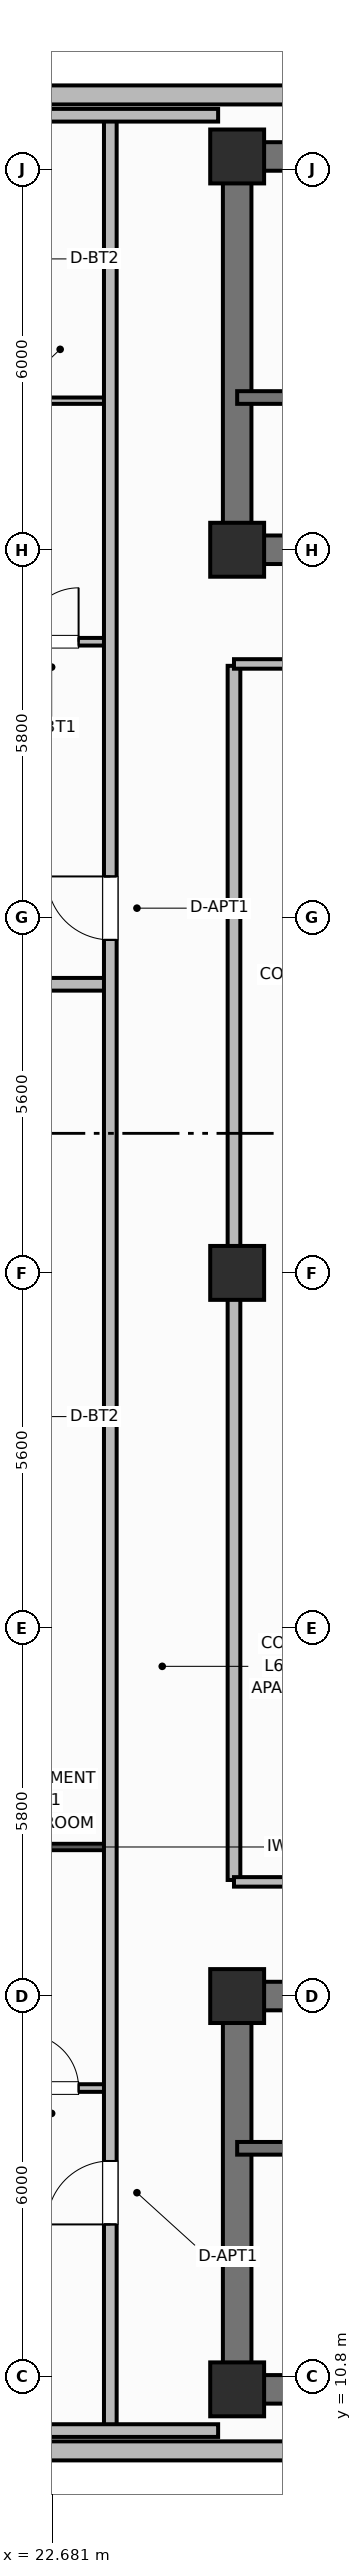
"""IFC4 building model, lengths in metres.
Left out: names, types, materials, properties, quantities, classifications, styles, units other than length and angle.
Written with IfcOpenShell. Run it as: python <this file> out.ifc"""

import sys

from ifc_helpers import new_model, si_unit, direction, frame, frame_2d, origin, origin_2d, place, context, subcontext, project, spatial, rectangle, extrude, element, fill, save


model = new_model("IFC4")
c1 = context("Model", 3, precision=1e-05, world=origin(), true_north=direction((0.0, 1.0)))
c2 = subcontext(c1, "Body", "Model", "MODEL_VIEW")
j1 = project(units=[si_unit("LENGTHUNIT", "METRE"), si_unit("PLANEANGLEUNIT", "RADIAN")], contexts=[c1])
p1 = place(None, origin())
s1 = spatial("IfcSite", under=j1, at=p1, CompositionType="ELEMENT")
p2 = place(p1, origin())
s2 = spatial("IfcBuilding", under=s1, at=p2, CompositionType="ELEMENT")
p3 = place(p2, frame((0.0, 0.0, 251.7)))
s3 = spatial("IfcBuildingStorey", under=s2, at=p3, CompositionType="ELEMENT", Elevation=251.7)
p4 = place(p3, frame((52.8, 10.6, 0.0), z_axis=(0.0, 0.0, 1.0), x_axis=(-1.0, 0.0, 0.0)))
e1 = element("IfcWall", 1, at=p4, inside=s3, PredefinedType="SHEAR", context=c2, shape_type="SweptSolid", body=[
    extrude(rectangle(XDim=27.2, YDim=0.45, at=frame_2d((13.6, 0.0))), origin(), (0.0, 0.0, 1.0), 3.7),
])
p5 = place(p3, frame((25.6, 10.825, 0.0), z_axis=(0.0, 0.0, 1.0), x_axis=(0.0, 1.0, 0.0)))
e2 = element("IfcWall", 2, at=p5, inside=s3, PredefinedType="SHEAR", context=c2, shape_type="SweptSolid", body=[
    extrude(rectangle(XDim=5.75, YDim=0.45, at=frame_2d((2.875, 0.0))), origin(), (0.0, 0.0, 1.0), 3.7),
])
p6 = place(p3, frame((25.6, 16.8, 0.0), z_axis=(0.0, 0.0, 1.0), x_axis=(1.0, 0.0, 0.0)))
e3 = element("IfcWall", 3, at=p6, inside=s3, PredefinedType="SHEAR", context=c2, shape_type="SweptSolid", body=[
    extrude(rectangle(XDim=27.2, YDim=0.45, at=frame_2d((13.6, 0.0))), origin(), (0.0, 0.0, 1.0), 3.7),
])
p7 = place(p6, frame((1.8, 0.0, 0.0)))
e4 = element("IfcOpeningElement", 4, at=p7, cuts=e3, PredefinedType="OPENING", context=c2, shape_type="SweptSolid", body=[
    extrude(rectangle(XDim=1.1, YDim=2.15, at=frame_2d((0.55, 1.075))), frame((0.0, 0.235, 0.0), z_axis=(0.0, -1.0, 0.0), x_axis=(1.0, 0.0, 0.0)), (0.0, 0.0, 1.0), 0.47),
])
p8 = place(p6, frame((5.6, 0.0, 0.0)))
e5 = element("IfcOpeningElement", 5, at=p8, cuts=e3, PredefinedType="OPENING", context=c2, shape_type="SweptSolid", body=[
    extrude(rectangle(XDim=0.85, YDim=2.1, at=frame_2d((0.425, 1.05))), frame((0.0, 0.235, 0.0), z_axis=(0.0, -1.0, 0.0), x_axis=(1.0, 0.0, 0.0)), (0.0, 0.0, 1.0), 0.47),
])
p9 = place(p6, frame((13.0, 0.0, 0.0)))
e6 = element("IfcOpeningElement", 6, at=p9, cuts=e3, PredefinedType="OPENING", context=c2, shape_type="SweptSolid", body=[
    extrude(rectangle(XDim=1.2, YDim=2.15, at=frame_2d((0.6, 1.075))), frame((0.0, 0.235, 0.0), z_axis=(0.0, -1.0, 0.0), x_axis=(1.0, 0.0, 0.0)), (0.0, 0.0, 1.0), 0.47),
])
p10 = place(p6, frame((19.2, 0.0, 0.0)))
e7 = element("IfcOpeningElement", 7, at=p10, cuts=e3, PredefinedType="OPENING", context=c2, shape_type="SweptSolid", body=[
    extrude(rectangle(XDim=0.85, YDim=2.1, at=frame_2d((0.425, 1.05))), frame((0.0, 0.235, 0.0), z_axis=(0.0, -1.0, 0.0), x_axis=(1.0, 0.0, 0.0)), (0.0, 0.0, 1.0), 0.47),
])
p11 = place(p6, frame((23.8, 0.0, 0.0)))
e8 = element("IfcOpeningElement", 8, at=p11, cuts=e3, PredefinedType="OPENING", context=c2, shape_type="SweptSolid", body=[
    extrude(rectangle(XDim=0.9, YDim=2.1, at=frame_2d((0.45, 1.05))), frame((0.0, 0.235, 0.0), z_axis=(0.0, -1.0, 0.0), x_axis=(1.0, 0.0, 0.0)), (0.0, 0.0, 1.0), 0.47),
])
p12 = place(p3, frame((25.6, 45.8, 0.0), z_axis=(0.0, 0.0, 1.0), x_axis=(1.0, 0.0, 0.0)))
e9 = element("IfcWall", 9, at=p12, inside=s3, PredefinedType="SHEAR", context=c2, shape_type="SweptSolid", body=[
    extrude(rectangle(XDim=27.2, YDim=0.45, at=frame_2d((13.6, 0.0))), origin(), (0.0, 0.0, 1.0), 3.7),
])
p13 = place(p3, frame((25.6, 39.825, 0.0), z_axis=(0.0, 0.0, 1.0), x_axis=(0.0, 1.0, 0.0)))
e10 = element("IfcWall", 10, at=p13, inside=s3, PredefinedType="SHEAR", context=c2, shape_type="SweptSolid", body=[
    extrude(rectangle(XDim=5.75, YDim=0.45, at=frame_2d((2.875, 0.0))), origin(), (0.0, 0.0, 1.0), 3.7),
])
p14 = place(p3, frame((52.8, 39.6, 0.0), z_axis=(0.0, 0.0, 1.0), x_axis=(-1.0, 0.0, 0.0)))
e11 = element("IfcWall", 11, at=p14, inside=s3, PredefinedType="SHEAR", context=c2, shape_type="SweptSolid", body=[
    extrude(rectangle(XDim=27.2, YDim=0.45, at=frame_2d((13.6, 0.0))), origin(), (0.0, 0.0, 1.0), 3.7),
])
p15 = place(p14, frame((24.2, 0.0, 0.0)))
e12 = element("IfcOpeningElement", 12, at=p15, cuts=e11, PredefinedType="OPENING", context=c2, shape_type="SweptSolid", body=[
    extrude(rectangle(XDim=1.1, YDim=2.15, at=frame_2d((0.55, 1.075))), frame((0.0, 0.235, 0.0), z_axis=(0.0, -1.0, 0.0), x_axis=(1.0, 0.0, 0.0)), (0.0, 0.0, 1.0), 0.47),
])
p16 = place(p14, frame((20.55, 0.0, 0.0)))
e13 = element("IfcOpeningElement", 13, at=p16, cuts=e11, PredefinedType="OPENING", context=c2, shape_type="SweptSolid", body=[
    extrude(rectangle(XDim=0.95, YDim=2.1, at=frame_2d((0.475, 1.05))), frame((0.0, 0.235, 0.0), z_axis=(0.0, -1.0, 0.0), x_axis=(1.0, 0.0, 0.0)), (0.0, 0.0, 1.0), 0.47),
])
p17 = place(p14, frame((15.1, 0.0, 0.0)))
e14 = element("IfcOpeningElement", 14, at=p17, cuts=e11, PredefinedType="OPENING", context=c2, shape_type="SweptSolid", body=[
    extrude(rectangle(XDim=1.2, YDim=2.15, at=frame_2d((0.6, 1.075))), frame((0.0, 0.235, 0.0), z_axis=(0.0, -1.0, 0.0), x_axis=(1.0, 0.0, 0.0)), (0.0, 0.0, 1.0), 0.47),
])
p18 = place(p14, frame((13.05, 0.0, 0.0)))
e15 = element("IfcOpeningElement", 15, at=p18, cuts=e11, PredefinedType="OPENING", context=c2, shape_type="SweptSolid", body=[
    extrude(rectangle(XDim=0.85, YDim=2.1, at=frame_2d((0.425, 1.05))), frame((0.0, 0.235, 0.0), z_axis=(0.0, -1.0, 0.0), x_axis=(1.0, 0.0, 0.0)), (0.0, 0.0, 1.0), 0.47),
])
p19 = place(p14, frame((11.0, 0.0, 0.0)))
e16 = element("IfcOpeningElement", 16, at=p19, cuts=e11, PredefinedType="OPENING", context=c2, shape_type="SweptSolid", body=[
    extrude(rectangle(XDim=0.85, YDim=2.1, at=frame_2d((0.425, 1.05))), frame((0.0, 0.235, 0.0), z_axis=(0.0, -1.0, 0.0), x_axis=(1.0, 0.0, 0.0)), (0.0, 0.0, 1.0), 0.47),
])
p20 = place(p14, frame((7.35, 0.0, 0.0)))
e17 = element("IfcOpeningElement", 17, at=p20, cuts=e11, PredefinedType="OPENING", context=c2, shape_type="SweptSolid", body=[
    extrude(rectangle(XDim=0.85, YDim=2.1, at=frame_2d((0.425, 1.05))), frame((0.0, 0.235, 0.0), z_axis=(0.0, -1.0, 0.0), x_axis=(1.0, 0.0, 0.0)), (0.0, 0.0, 1.0), 0.47),
])
p21 = place(p14, frame((4.2, 0.0, 0.0)))
e18 = element("IfcOpeningElement", 18, at=p21, cuts=e11, PredefinedType="OPENING", context=c2, shape_type="SweptSolid", body=[
    extrude(rectangle(XDim=1.3, YDim=2.2, at=frame_2d((0.65, 1.1))), frame((0.0, 0.235, 0.0), z_axis=(0.0, -1.0, 0.0), x_axis=(1.0, 0.0, 0.0)), (0.0, 0.0, 1.0), 0.47),
])
for number, where, z_axis, x_axis in (
    (19, (25.6, 10.6, 0.0), (0.0, 0.0, 1.0), (1.0, 0.0, 0.0)),
    (20, (25.6, 16.8, 0.0), (0.0, 0.0, 1.0), (1.0, 0.0, 0.0)),
    (21, (25.6, 39.6, 0.0), (0.0, 0.0, 1.0), (1.0, 0.0, 0.0)),
    (22, (25.6, 45.8, 0.0), (0.0, 0.0, 1.0), (1.0, 0.0, 0.0)),
    (23, (25.6, 28.2, 0.0), (0.0, 0.0, 1.0), (1.0, 0.0, 0.0)),
):
    element("IfcColumn", number, at=place(p3, frame(where, z_axis=z_axis, x_axis=x_axis)), inside=s3, PredefinedType="COLUMN", context=c2, shape_type="SweptSolid", body=[
        extrude(rectangle(XDim=0.85, YDim=0.85, at=origin_2d()), origin(), (0.0, 0.0, 1.0), 3.7),
    ])
p22 = place(p3, frame((22.56, 9.63, 0.0), z_axis=(0.0, 0.0, 1.0), x_axis=(1.0, 0.0, 0.0)))
e24 = element("IfcWall", 24, at=p22, inside=s3, PredefinedType="SOLIDWALL", context=c2, shape_type="SweptSolid", body=[
    extrude(rectangle(XDim=33.28, YDim=0.3, at=frame_2d((16.64, 0.0))), origin(), (0.0, 0.0, 1.0), 2.73),
])
p23 = place(p22, frame((4.461, 0.0, 0.95)))
e25 = element("IfcOpeningElement", 25, at=p23, cuts=e24, PredefinedType="OPENING", context=c2, shape_type="SweptSolid", body=[
    extrude(rectangle(XDim=1.1, YDim=1.65, at=frame_2d((0.55, 0.825))), frame((0.0, 0.16, 0.0), z_axis=(0.0, -1.0, 0.0), x_axis=(1.0, 0.0, 0.0)), (0.0, 0.0, 1.0), 0.32),
])
p24 = place(p22, frame((7.368, 0.0, 0.95)))
e26 = element("IfcOpeningElement", 26, at=p24, cuts=e24, PredefinedType="OPENING", context=c2, shape_type="SweptSolid", body=[
    extrude(rectangle(XDim=1.1, YDim=1.65, at=frame_2d((0.55, 0.825))), frame((0.0, 0.16, 0.0), z_axis=(0.0, -1.0, 0.0), x_axis=(1.0, 0.0, 0.0)), (0.0, 0.0, 1.0), 0.32),
])
p25 = place(p22, frame((10.275, 0.0, 0.95)))
e27 = element("IfcOpeningElement", 27, at=p25, cuts=e24, PredefinedType="OPENING", context=c2, shape_type="SweptSolid", body=[
    extrude(rectangle(XDim=1.1, YDim=1.65, at=frame_2d((0.55, 0.825))), frame((0.0, 0.16, 0.0), z_axis=(0.0, -1.0, 0.0), x_axis=(1.0, 0.0, 0.0)), (0.0, 0.0, 1.0), 0.32),
])
p26 = place(p22, frame((13.883, 0.0, 0.95)))
e28 = element("IfcOpeningElement", 28, at=p26, cuts=e24, PredefinedType="OPENING", context=c2, shape_type="SweptSolid", body=[
    extrude(rectangle(XDim=1.1, YDim=1.65, at=frame_2d((0.55, 0.825))), frame((0.0, 0.16, 0.0), z_axis=(0.0, -1.0, 0.0), x_axis=(1.0, 0.0, 0.0)), (0.0, 0.0, 1.0), 0.32),
])
p27 = place(p22, frame((16.09, 0.0, 0.95)))
e29 = element("IfcOpeningElement", 29, at=p27, cuts=e24, PredefinedType="OPENING", context=c2, shape_type="SweptSolid", body=[
    extrude(rectangle(XDim=1.1, YDim=1.65, at=frame_2d((0.55, 0.825))), frame((0.0, 0.16, 0.0), z_axis=(0.0, -1.0, 0.0), x_axis=(1.0, 0.0, 0.0)), (0.0, 0.0, 1.0), 0.32),
])
p28 = place(p22, frame((18.297, 0.0, 0.95)))
e30 = element("IfcOpeningElement", 30, at=p28, cuts=e24, PredefinedType="OPENING", context=c2, shape_type="SweptSolid", body=[
    extrude(rectangle(XDim=1.1, YDim=1.65, at=frame_2d((0.55, 0.825))), frame((0.0, 0.16, 0.0), z_axis=(0.0, -1.0, 0.0), x_axis=(1.0, 0.0, 0.0)), (0.0, 0.0, 1.0), 0.32),
])
p29 = place(p22, frame((21.905, 0.0, 0.95)))
e31 = element("IfcOpeningElement", 31, at=p29, cuts=e24, PredefinedType="OPENING", context=c2, shape_type="SweptSolid", body=[
    extrude(rectangle(XDim=1.1, YDim=1.65, at=frame_2d((0.55, 0.825))), frame((0.0, 0.16, 0.0), z_axis=(0.0, -1.0, 0.0), x_axis=(1.0, 0.0, 0.0)), (0.0, 0.0, 1.0), 0.32),
])
p30 = place(p22, frame((24.812, 0.0, 0.95)))
e32 = element("IfcOpeningElement", 32, at=p30, cuts=e24, PredefinedType="OPENING", context=c2, shape_type="SweptSolid", body=[
    extrude(rectangle(XDim=1.1, YDim=1.65, at=frame_2d((0.55, 0.825))), frame((0.0, 0.16, 0.0), z_axis=(0.0, -1.0, 0.0), x_axis=(1.0, 0.0, 0.0)), (0.0, 0.0, 1.0), 0.32),
])
p31 = place(p22, frame((27.719, 0.0, 0.95)))
e33 = element("IfcOpeningElement", 33, at=p31, cuts=e24, PredefinedType="OPENING", context=c2, shape_type="SweptSolid", body=[
    extrude(rectangle(XDim=1.1, YDim=1.65, at=frame_2d((0.55, 0.825))), frame((0.0, 0.16, 0.0), z_axis=(0.0, -1.0, 0.0), x_axis=(1.0, 0.0, 0.0)), (0.0, 0.0, 1.0), 0.32),
])
p32 = place(p3, frame((55.84, 46.77, 0.0), z_axis=(0.0, 0.0, 1.0), x_axis=(-1.0, 0.0, 0.0)))
e34 = element("IfcWall", 34, at=p32, inside=s3, PredefinedType="SOLIDWALL", context=c2, shape_type="SweptSolid", body=[
    extrude(rectangle(XDim=33.28, YDim=0.3, at=frame_2d((16.64, 0.0))), origin(), (0.0, 0.0, 1.0), 2.73),
])
p33 = place(p32, frame((4.647, 0.0, 0.71)))
e35 = element("IfcOpeningElement", 35, at=p33, cuts=e34, PredefinedType="OPENING", context=c2, shape_type="SweptSolid", body=[
    extrude(rectangle(XDim=1.6, YDim=1.9, at=frame_2d((0.8, 0.95))), frame((0.0, 0.16, 0.0), z_axis=(0.0, -1.0, 0.0), x_axis=(1.0, 0.0, 0.0)), (0.0, 0.0, 1.0), 0.32),
])
p34 = place(p32, frame((7.845, 0.0, 0.71)))
e36 = element("IfcOpeningElement", 36, at=p34, cuts=e34, PredefinedType="OPENING", context=c2, shape_type="SweptSolid", body=[
    extrude(rectangle(XDim=1.6, YDim=1.9, at=frame_2d((0.8, 0.95))), frame((0.0, 0.16, 0.0), z_axis=(0.0, -1.0, 0.0), x_axis=(1.0, 0.0, 0.0)), (0.0, 0.0, 1.0), 0.32),
])
p35 = place(p32, frame((14.241, 0.0, 0.71)))
e37 = element("IfcOpeningElement", 37, at=p35, cuts=e34, PredefinedType="OPENING", context=c2, shape_type="SweptSolid", body=[
    extrude(rectangle(XDim=1.6, YDim=1.9, at=frame_2d((0.8, 0.95))), frame((0.0, 0.16, 0.0), z_axis=(0.0, -1.0, 0.0), x_axis=(1.0, 0.0, 0.0)), (0.0, 0.0, 1.0), 0.32),
])
p36 = place(p32, frame((17.439, 0.0, 0.71)))
e38 = element("IfcOpeningElement", 38, at=p36, cuts=e34, PredefinedType="OPENING", context=c2, shape_type="SweptSolid", body=[
    extrude(rectangle(XDim=1.6, YDim=1.9, at=frame_2d((0.8, 0.95))), frame((0.0, 0.16, 0.0), z_axis=(0.0, -1.0, 0.0), x_axis=(1.0, 0.0, 0.0)), (0.0, 0.0, 1.0), 0.32),
])
p37 = place(p32, frame((23.835, 0.0, 0.71)))
e39 = element("IfcOpeningElement", 39, at=p37, cuts=e34, PredefinedType="OPENING", context=c2, shape_type="SweptSolid", body=[
    extrude(rectangle(XDim=1.6, YDim=1.9, at=frame_2d((0.8, 0.95))), frame((0.0, 0.16, 0.0), z_axis=(0.0, -1.0, 0.0), x_axis=(1.0, 0.0, 0.0)), (0.0, 0.0, 1.0), 0.32),
])
p38 = place(p32, frame((27.033, 0.0, 0.71)))
e40 = element("IfcOpeningElement", 40, at=p38, cuts=e34, PredefinedType="OPENING", context=c2, shape_type="SweptSolid", body=[
    extrude(rectangle(XDim=1.6, YDim=1.9, at=frame_2d((0.8, 0.95))), frame((0.0, 0.16, 0.0), z_axis=(0.0, -1.0, 0.0), x_axis=(1.0, 0.0, 0.0)), (0.0, 0.0, 1.0), 0.32),
])
p39 = place(p3, frame((25.6, 14.4, 0.0), z_axis=(0.0, 0.0, 1.0), x_axis=(1.0, 0.0, 0.0)))
e41 = element("IfcWall", 41, at=p39, inside=s3, PredefinedType="SHEAR", context=c2, shape_type="SweptSolid", body=[
    extrude(rectangle(XDim=9.55, YDim=0.2, at=frame_2d((4.775, 0.0))), origin(), (0.0, 0.0, 1.0), 3.7),
])
p40 = place(p39, frame((1.05, 0.0, 0.0)))
e42 = element("IfcOpeningElement", 42, at=p40, cuts=e41, PredefinedType="OPENING", context=c2, shape_type="SweptSolid", body=[
    extrude(rectangle(XDim=1.1, YDim=2.15, at=frame_2d((0.55, 1.075))), frame((0.0, 0.11, 0.0), z_axis=(0.0, -1.0, 0.0), x_axis=(1.0, 0.0, 0.0)), (0.0, 0.0, 1.0), 0.22),
])
p41 = place(p3, frame((35.15, 42.0, 0.0), z_axis=(0.0, 0.0, 1.0), x_axis=(-1.0, 0.0, 0.0)))
e43 = element("IfcWall", 43, at=p41, inside=s3, PredefinedType="SHEAR", context=c2, shape_type="SweptSolid", body=[
    extrude(rectangle(XDim=9.55, YDim=0.2, at=frame_2d((4.775, 0.0))), origin(), (0.0, 0.0, 1.0), 3.7),
])
p42 = place(p41, frame((7.25, 0.0, 0.0)))
e44 = element("IfcOpeningElement", 44, at=p42, cuts=e43, PredefinedType="OPENING", context=c2, shape_type="SweptSolid", body=[
    extrude(rectangle(XDim=1.1, YDim=2.15, at=frame_2d((0.55, 1.075))), frame((0.0, 0.11, 0.0), z_axis=(0.0, -1.0, 0.0), x_axis=(1.0, 0.0, 0.0)), (0.0, 0.0, 1.0), 0.22),
])
p43 = place(p3, frame((25.55, 18.63, 0.0), z_axis=(0.0, 0.0, 1.0), x_axis=(0.0, 1.0, 0.0)))
e45 = element("IfcWall", 45, at=p43, inside=s3, PredefinedType="PARTITIONING", context=c2, shape_type="SweptSolid", body=[
    extrude(rectangle(XDim=19.14, YDim=0.2, at=frame_2d((9.57, 0.0))), origin(), (0.0, 0.0, 1.0), 2.56),
])
for number, where, z_axis, x_axis in (
    (46, (25.55, 18.6, 0.0), (0.0, 0.0, 1.0), (1.0, 0.0, 0.0)),
    (47, (25.55, 37.8, 0.0), (0.0, 0.0, 1.0), (1.0, 0.0, 0.0)),
):
    element("IfcWall", number, at=place(p3, frame(where, z_axis=z_axis, x_axis=x_axis)), inside=s3, PredefinedType="PARTITIONING", context=c2, shape_type="SweptSolid", body=[
        extrude(rectangle(XDim=3.5, YDim=0.15, at=frame_2d((1.75, 0.0))), origin(), (0.0, 0.0, 1.0), 2.56),
    ])
p44 = place(p3, frame((21.65, 15.35, 0.0), z_axis=(0.0, 0.0, 1.0), x_axis=(1.0, 0.0, 0.0)))
e48 = element("IfcWall", 48, at=p44, inside=s3, PredefinedType="PARTITIONING", context=c2, shape_type="SweptSolid", body=[
    extrude(rectangle(XDim=1.95, YDim=0.12, at=frame_2d((0.975, 0.0))), origin(), (0.0, 0.0, 1.0), 2.56),
])
p45 = place(p44, frame((0.6, 0.0, 0.0)))
e49 = element("IfcOpeningElement", 49, at=p45, cuts=e48, PredefinedType="OPENING", context=c2, shape_type="SweptSolid", body=[
    extrude(rectangle(XDim=0.85, YDim=2.1, at=frame_2d((0.425, 1.05))), frame((0.0, 0.07, 0.0), z_axis=(0.0, -1.0, 0.0), x_axis=(1.0, 0.0, 0.0)), (0.0, 0.0, 1.0), 0.14),
])
p46 = place(p3, frame((21.65, 19.15, 0.0), z_axis=(0.0, 0.0, 1.0), x_axis=(1.0, 0.0, 0.0)))
e50 = element("IfcWall", 50, at=p46, inside=s3, PredefinedType="PARTITIONING", context=c2, shape_type="SweptSolid", body=[
    extrude(rectangle(XDim=1.95, YDim=0.1, at=frame_2d((0.975, 0.0))), origin(), (0.0, 0.0, 1.0), 2.56),
])
p47 = place(p3, frame((19.53, 32.75, 0.0), z_axis=(0.0, 0.0, 1.0), x_axis=(1.0, 0.0, 0.0)))
e51 = element("IfcWall", 51, at=p47, inside=s3, PredefinedType="PARTITIONING", context=c2, shape_type="SweptSolid", body=[
    extrude(rectangle(XDim=4.07, YDim=0.2, at=frame_2d((2.035, 0.0))), origin(), (0.0, 0.0, 1.0), 2.56),
])
p48 = place(p3, frame((21.65, 38.15, 0.0), z_axis=(0.0, 0.0, 1.0), x_axis=(1.0, 0.0, 0.0)))
e52 = element("IfcWall", 52, at=p48, inside=s3, PredefinedType="PARTITIONING", context=c2, shape_type="SweptSolid", body=[
    extrude(rectangle(XDim=1.95, YDim=0.12, at=frame_2d((0.975, 0.0))), origin(), (0.0, 0.0, 1.0), 2.56),
])
p49 = place(p48, frame((0.6, 0.0, 0.0)))
e53 = element("IfcOpeningElement", 53, at=p49, cuts=e52, PredefinedType="OPENING", context=c2, shape_type="SweptSolid", body=[
    extrude(rectangle(XDim=0.85, YDim=2.1, at=frame_2d((0.425, 1.05))), frame((0.0, 0.07, 0.0), z_axis=(0.0, -1.0, 0.0), x_axis=(1.0, 0.0, 0.0)), (0.0, 0.0, 1.0), 0.14),
])
p50 = place(p3, frame((21.65, 41.95, 0.0), z_axis=(0.0, 0.0, 1.0), x_axis=(1.0, 0.0, 0.0)))
e54 = element("IfcWall", 54, at=p50, inside=s3, PredefinedType="PARTITIONING", context=c2, shape_type="SweptSolid", body=[
    extrude(rectangle(XDim=1.95, YDim=0.1, at=frame_2d((0.975, 0.0))), origin(), (0.0, 0.0, 1.0), 2.56),
])
p51 = place(p3, frame((23.6, 9.95, 0.0), z_axis=(0.0, 0.0, 1.0), x_axis=(0.0, 1.0, 0.0)))
e55 = element("IfcWall", 55, at=p51, inside=s3, PredefinedType="PARTITIONING", context=c2, shape_type="SweptSolid", body=[
    extrude(rectangle(XDim=36.5, YDim=0.2, at=frame_2d((18.25, 0.0))), origin(), (0.0, 0.0, 1.0), 2.56),
])
p52 = place(p51, frame((3.25, 0.0, 0.0)))
e56 = element("IfcOpeningElement", 56, at=p52, cuts=e55, PredefinedType="OPENING", context=c2, shape_type="SweptSolid", body=[
    extrude(rectangle(XDim=1.0, YDim=2.15, at=frame_2d((0.5, 1.075))), frame((0.0, 0.11, 0.0), z_axis=(0.0, -1.0, 0.0), x_axis=(1.0, 0.0, 0.0)), (0.0, 0.0, 1.0), 0.22),
])
p53 = place(p51, frame((23.5, 0.0, 0.0)))
e57 = element("IfcOpeningElement", 57, at=p53, cuts=e55, PredefinedType="OPENING", context=c2, shape_type="SweptSolid", body=[
    extrude(rectangle(XDim=1.0, YDim=2.15, at=frame_2d((0.5, 1.075))), frame((0.0, 0.11, 0.0), z_axis=(0.0, -1.0, 0.0), x_axis=(1.0, 0.0, 0.0)), (0.0, 0.0, 1.0), 0.22),
])
for number, where, z_axis, x_axis in (
    (58, (21.546, 9.95, 0.0), (0.0, 0.0, 1.0), (1.0, 0.0, 0.0)),
    (59, (21.546, 46.45, 0.0), (0.0, 0.0, 1.0), (1.0, 0.0, 0.0)),
):
    element("IfcWall", number, at=place(p3, frame(where, z_axis=z_axis, x_axis=x_axis)), inside=s3, PredefinedType="PARTITIONING", context=c2, shape_type="SweptSolid", body=[
        extrude(rectangle(XDim=3.754, YDim=0.2, at=frame_2d((1.877, 0.0))), origin(), (0.0, 0.0, 1.0), 2.56),
    ])
p54 = place(p45, origin())
e60 = element("IfcDoor", 60, at=p54, inside=s3, OperationType="SINGLE_SWING_LEFT", PredefinedType="DOOR", context=c2, shape_type="SweptSolid", body=[
    extrude(rectangle(XDim=0.85, YDim=2.1, at=frame_2d((0.425, 1.05))), frame((0.0, 0.025, 0.0), z_axis=(0.0, -1.0, 0.0), x_axis=(1.0, 0.0, 0.0)), (0.0, 0.0, 1.0), 0.05),
])
fill(e49, e60)
p55 = place(p49, origin())
e61 = element("IfcDoor", 61, at=p55, inside=s3, OperationType="SINGLE_SWING_RIGHT", PredefinedType="DOOR", context=c2, shape_type="SweptSolid", body=[
    extrude(rectangle(XDim=0.85, YDim=2.1, at=frame_2d((0.425, 1.05))), frame((0.0, 0.025, 0.0), z_axis=(0.0, -1.0, 0.0), x_axis=(1.0, 0.0, 0.0)), (0.0, 0.0, 1.0), 0.05),
])
fill(e53, e61)
p56 = place(p52, origin())
e62 = element("IfcDoor", 62, at=p56, inside=s3, OperationType="SINGLE_SWING_LEFT", PredefinedType="DOOR", context=c2, shape_type="SweptSolid", body=[
    extrude(rectangle(XDim=1.0, YDim=2.15, at=frame_2d((0.5, 1.075))), frame((0.0, 0.025, 0.0), z_axis=(0.0, -1.0, 0.0), x_axis=(1.0, 0.0, 0.0)), (0.0, 0.0, 1.0), 0.05),
])
fill(e56, e62)
p57 = place(p53, origin())
e63 = element("IfcDoor", 63, at=p57, inside=s3, OperationType="SINGLE_SWING_RIGHT", PredefinedType="DOOR", context=c2, shape_type="SweptSolid", body=[
    extrude(rectangle(XDim=1.0, YDim=2.15, at=frame_2d((0.5, 1.075))), frame((0.0, 0.025, 0.0), z_axis=(0.0, -1.0, 0.0), x_axis=(1.0, 0.0, 0.0)), (0.0, 0.0, 1.0), 0.05),
])
fill(e57, e63)
save(model, sys.argv[1])
